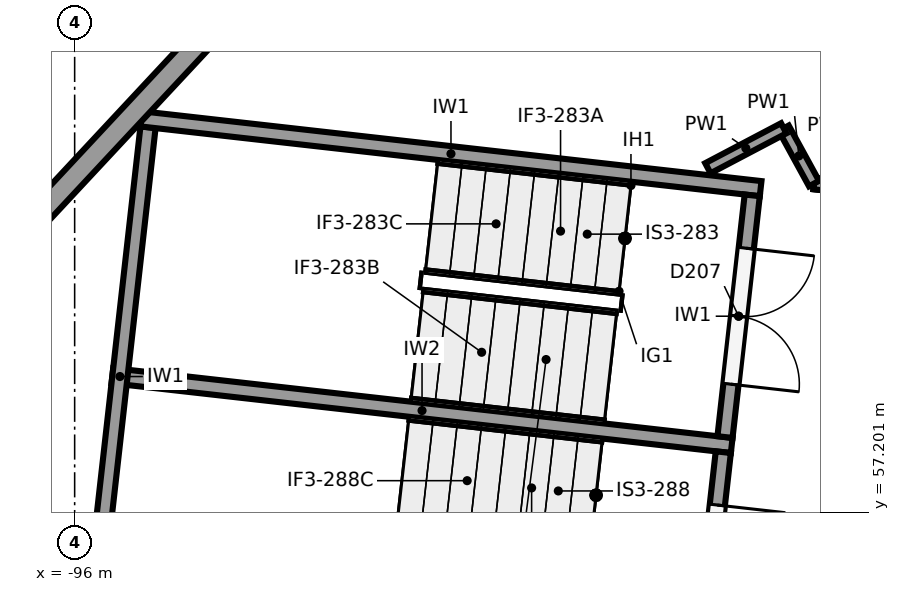
"""IFC4 building model, lengths in metres.
Left out: names, types, materials, properties, quantities, classifications, styles, units other than length and angle.
Written with IfcOpenShell. Run it as: python <this file> out.ifc"""

import sys

from ifc_helpers import new_model, si_unit, direction, frame, frame_2d, origin, place, context, subcontext, project, spatial, rectangle, extrude, element, fill, save


model = new_model("IFC4")
c1 = context("Model", 3, precision=1e-05, world=origin(), true_north=direction((0.0, 1.0)))
c2 = subcontext(c1, "Body", "Model", "MODEL_VIEW")
j1 = project(units=[si_unit("LENGTHUNIT", "METRE"), si_unit("PLANEANGLEUNIT", "RADIAN")], contexts=[c1])
p1 = place(None, origin())
s1 = spatial("IfcSite", under=j1, at=p1, CompositionType="ELEMENT")
p2 = place(p1, origin())
s2 = spatial("IfcBuilding", under=s1, at=p2, CompositionType="ELEMENT")
p3 = place(p2, frame((0.0, 0.0, 6.5)))
s3 = spatial("IfcBuildingStorey", under=s2, at=p3, CompositionType="ELEMENT", Elevation=6.5)
p4 = place(p3, frame((-100.711, 56.568, 0.0), z_axis=(0.0, 0.0, 1.0), x_axis=(0.681794658463, 0.731543603411, 0.0)))
e1 = element("IfcWall", 1, at=p4, inside=s3, PredefinedType="SOLIDWALL", context=c2, shape_type="SweptSolid", body=[
    extrude(rectangle(XDim=12.514, YDim=0.3, at=frame_2d((6.257, 0.0))), origin(), (0.0, 0.0, 1.0), 3.85),
])
p5 = place(p3, frame((-95.123, 62.378, 0.0), z_axis=(0.0, 0.0, 1.0), x_axis=(0.993710792168, -0.111977058046, 0.0)))
e2 = element("IfcWall", 2, at=p5, inside=s3, PredefinedType="SHEAR", context=c2, shape_type="SweptSolid", body=[
    extrude(rectangle(XDim=8.2, YDim=0.2, at=frame_2d((4.1, 0.0))), origin(), (0.0, 0.0, 1.0), 5.15),
])
p6 = place(p3, frame((-95.035, 62.267, 0.0), z_axis=(0.0, 0.0, 1.0), x_axis=(-0.111933579504, -0.993715690617, 0.0)))
e3 = element("IfcWall", 3, at=p6, inside=s3, PredefinedType="SHEAR", context=c2, shape_type="SweptSolid", body=[
    extrude(rectangle(XDim=6.6, YDim=0.2, at=frame_2d((3.3, 0.0))), origin(), (0.0, 0.0, 1.0), 5.15),
])
p7 = place(p3, frame((-95.504, 58.999, 0.0), z_axis=(0.0, 0.0, 1.0), x_axis=(0.993710792168, -0.111977058046, 0.0)))
e4 = element("IfcWall", 4, at=p7, inside=s3, PredefinedType="SHEAR", context=c2, shape_type="SweptSolid", body=[
    extrude(rectangle(XDim=8.2, YDim=0.2, at=frame_2d((4.1, 0.0))), origin(), (0.0, 0.0, 1.0), 5.15),
])
p8 = place(p3, frame((-87.085, 61.372, 0.0), z_axis=(0.0, 0.0, 1.0), x_axis=(-0.11192190762, -0.993717005286, 0.0)))
e5 = element("IfcWall", 5, at=p8, inside=s3, PredefinedType="SHEAR", context=c2, shape_type="SweptSolid", body=[
    extrude(rectangle(XDim=3.2, YDim=0.2, at=frame_2d((1.6, 0.0))), origin(), (0.0, 0.0, 1.0), 5.15),
])
p9 = place(p8, frame((0.7, 0.0, 0.0)))
e6 = element("IfcOpeningElement", 6, at=p9, cuts=e5, PredefinedType="OPENING", context=c2, shape_type="SweptSolid", body=[
    extrude(rectangle(XDim=1.8, YDim=2.1, at=frame_2d((0.9, 1.05))), frame((0.0, 0.11, 0.0), z_axis=(0.0, -1.0, 0.0), x_axis=(1.0, 0.0, 0.0)), (0.0, 0.0, 1.0), 0.22),
])
p10 = place(p3, frame((-87.466, 57.993, 0.0), z_axis=(0.0, 0.0, 1.0), x_axis=(-0.111997244021, -0.993708517288, 0.0)))
e7 = element("IfcWall", 7, at=p10, inside=s3, PredefinedType="SHEAR", context=c2, shape_type="SweptSolid", body=[
    extrude(rectangle(XDim=3.2, YDim=0.2, at=frame_2d((1.6, 0.0))), origin(), (0.0, 0.0, 1.0), 5.15),
])
p11 = place(p10, frame((0.7, 0.0, 0.0)))
e8 = element("IfcOpeningElement", 8, at=p11, cuts=e7, PredefinedType="OPENING", context=c2, shape_type="SweptSolid", body=[
    extrude(rectangle(XDim=1.8, YDim=2.1, at=frame_2d((0.9, 1.05))), frame((0.0, 0.11, 0.0), z_axis=(0.0, -1.0, 0.0), x_axis=(1.0, 0.0, 0.0)), (0.0, 0.0, 1.0), 0.22),
])
p12 = place(p3, frame((-79.958, 60.815, 0.0), z_axis=(0.0, 0.0, 1.0), x_axis=(-0.99370867388, 0.111995854638, 0.0)))
e9 = element("IfcWall", 9, at=p12, inside=s3, PredefinedType="PARTITIONING", context=c2, shape_type="SweptSolid", body=[
    extrude(rectangle(XDim=6.354, YDim=0.15, at=frame_2d((3.177, 0.0))), origin(), (0.0, 0.0, 1.0), 4.05),
])
p13 = place(p12, frame((3.85, 0.0, 0.0)))
e10 = element("IfcOpeningElement", 10, at=p13, cuts=e9, PredefinedType="OPENING", context=c2, shape_type="SweptSolid", body=[
    extrude(rectangle(XDim=1.8, YDim=2.1, at=frame_2d((0.9, 1.05))), frame((0.0, 0.085, 0.0), z_axis=(0.0, -1.0, 0.0), x_axis=(1.0, 0.0, 0.0)), (0.0, 0.0, 1.0), 0.17),
])
p14 = place(p3, frame((-85.622, 61.453, 4.05), z_axis=(0.0, 0.0, 1.0), x_axis=(-0.993672626597, 0.11231523117, 0.0)))
e11 = element("IfcWall", 11, at=p14, inside=s3, PredefinedType="PARTITIONING", context=c2, shape_type="SweptSolid", body=[
    extrude(rectangle(XDim=0.654, YDim=0.15, at=frame_2d((0.327, 0.0))), origin(), (0.0, 0.0, 1.0), 1.1),
])
p15 = place(p3, frame((-86.272, 61.527, 0.0), z_axis=(0.0, 0.0, 1.0), x_axis=(-0.480336186773, 0.877084458691, 0.0)))
e12 = element("IfcWall", 12, at=p15, inside=s3, PredefinedType="PARTITIONING", context=c2, shape_type="SweptSolid", body=[
    extrude(rectangle(XDim=0.83, YDim=0.15, at=frame_2d((0.415, 0.0))), origin(), (0.0, 0.0, 1.0), 5.15),
])
p16 = place(p3, frame((-86.67, 62.254, 0.0), z_axis=(0.0, 0.0, 1.0), x_axis=(-0.884880656279, -0.465817801446, 0.0)))
e13 = element("IfcWall", 13, at=p16, inside=s3, PredefinedType="PARTITIONING", context=c2, shape_type="SweptSolid", body=[
    extrude(rectangle(XDim=1.128, YDim=0.15, at=frame_2d((0.564, 0.0))), origin(), (0.0, 0.0, 1.0), 5.15),
])
p17 = place(p9, origin())
e14 = element("IfcDoor", 14, at=p17, inside=s3, OperationType="DOUBLE_DOOR_SINGLE_SWING", PredefinedType="DOOR", context=c2, shape_type="SweptSolid", body=[
    extrude(rectangle(XDim=1.8, YDim=2.1, at=frame_2d((0.9, 1.05))), frame((0.0, 0.025, 0.0), z_axis=(0.0, -1.0, 0.0), x_axis=(1.0, 0.0, 0.0)), (0.0, 0.0, 1.0), 0.05),
])
fill(e6, e14)
p18 = place(p11, origin())
e15 = element("IfcDoor", 15, at=p18, inside=s3, OperationType="DOUBLE_DOOR_SINGLE_SWING", PredefinedType="DOOR", context=c2, shape_type="SweptSolid", body=[
    extrude(rectangle(XDim=1.8, YDim=2.1, at=frame_2d((0.9, 1.05))), frame((0.0, 0.025, 0.0), z_axis=(0.0, -1.0, 0.0), x_axis=(1.0, 0.0, 0.0)), (0.0, 0.0, 1.0), 0.05),
])
fill(e8, e15)
save(model, sys.argv[1])
